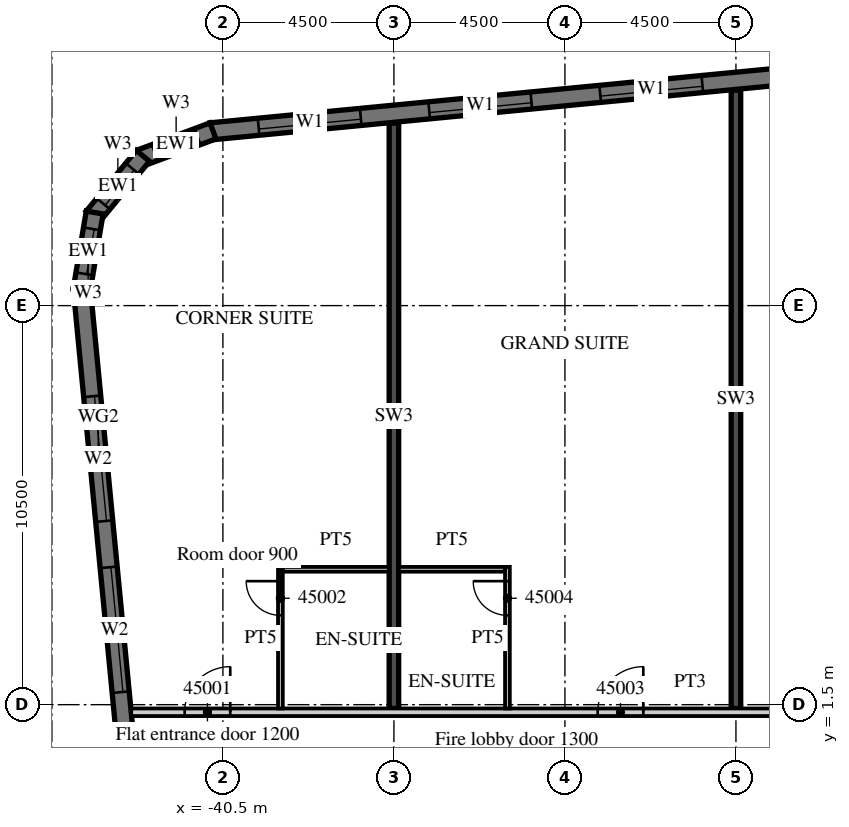
"""IFC4 building model, lengths in metres.
Left out: names, types, materials, properties, quantities, classifications, styles, units other than length and angle.
Written with IfcOpenShell. Run it as: python <this file> out.ifc"""

import sys

from ifc_helpers import new_model, si_unit, direction, frame, frame_2d, origin, place, context, subcontext, project, spatial, polyline, rectangle, outline, extrude, element, fill, save


model = new_model("IFC4")
c1 = context("Model", 3, precision=1e-05, world=origin(), true_north=direction((0.0, 1.0)))
c2 = subcontext(c1, "Body", "Model", "MODEL_VIEW")
j1 = project(units=[si_unit("LENGTHUNIT", "METRE"), si_unit("PLANEANGLEUNIT", "RADIAN")], contexts=[c1])
p1 = place(None, origin())
s1 = spatial("IfcSite", under=j1, at=p1, CompositionType="ELEMENT")
p2 = place(p1, origin())
s2 = spatial("IfcBuilding", under=s1, at=p2, CompositionType="ELEMENT")
p3 = place(p2, frame((0.0, 0.0, 190.0)))
s3 = spatial("IfcBuildingStorey", under=s2, at=p3, CompositionType="ELEMENT", Elevation=190.0)
p4 = place(p3, frame((-36.0, 1.4, 0.0), z_axis=(0.0, 0.0, 1.0), x_axis=(0.0, 1.0, 0.0)))
e1 = element("IfcWall", 1, at=p4, inside=s3, PredefinedType="SHEAR", context=c2, shape_type="SweptSolid", body=[
    extrude(rectangle(XDim=15.401, YDim=0.25, at=frame_2d((7.701, 0.0))), origin(), (0.0, 0.0, 1.0), 3.3),
])
p5 = place(p3, frame((-27.0, 1.4, 0.0), z_axis=(0.0, 0.0, 1.0), x_axis=(0.0, 1.0, 0.0)))
e2 = element("IfcWall", 2, at=p5, inside=s3, PredefinedType="SHEAR", context=c2, shape_type="SweptSolid", body=[
    extrude(rectangle(XDim=16.268, YDim=0.25, at=frame_2d((8.134, 0.0))), origin(), (0.0, 0.0, 1.0), 3.3),
])
p6 = place(p3, frame((-44.214, 12.466, 0.0), z_axis=(0.0, 0.0, 1.0), x_axis=(0.095847314626, -0.995396047952, 0.0)))
e3 = element("IfcWall", 3, at=p6, inside=s3, PredefinedType="SOLIDWALL", context=c2, shape_type="SweptSolid", body=[
    extrude(rectangle(XDim=34.0, YDim=0.45, at=frame_2d((17.0, 0.0))), origin(), (0.0, 0.0, 1.0), 3.02),
])
p7 = place(p6, frame((2.865, 0.0, 0.45)))
e4 = element("IfcOpeningElement", 4, at=p7, cuts=e3, PredefinedType="OPENING", context=c2, shape_type="SweptSolid", body=[
    extrude(rectangle(XDim=3.3, YDim=2.25, at=frame_2d((1.65, 1.125))), frame((0.0, 0.235, 0.0), z_axis=(0.0, -1.0, 0.0), x_axis=(1.0, 0.0, 0.0)), (0.0, 0.0, 1.0), 0.47),
])
p8 = place(p6, frame((7.386, 0.0, 0.45)))
e5 = element("IfcOpeningElement", 5, at=p8, cuts=e3, PredefinedType="OPENING", context=c2, shape_type="SweptSolid", body=[
    extrude(rectangle(XDim=3.3, YDim=2.25, at=frame_2d((1.65, 1.125))), frame((0.0, 0.235, 0.0), z_axis=(0.0, -1.0, 0.0), x_axis=(1.0, 0.0, 0.0)), (0.0, 0.0, 1.0), 0.47),
])
p9 = place(p3, frame((13.521, 21.817, 0.0), z_axis=(0.0, 0.0, 1.0), x_axis=(-0.995396508751, -0.095842529008, 0.0)))
e6 = element("IfcWall", 6, at=p9, inside=s3, PredefinedType="SOLIDWALL", context=c2, shape_type="SweptSolid", body=[
    extrude(rectangle(XDim=54.591, YDim=0.45, at=frame_2d((27.296, 0.0))), origin(), (0.0, 0.0, 1.0), 3.02),
])
p10 = place(p9, frame((0.91, 0.0, 0.45)))
e7 = element("IfcOpeningElement", 7, at=p10, cuts=e6, PredefinedType="OPENING", context=c2, shape_type="SweptSolid", body=[
    extrude(rectangle(XDim=2.7, YDim=2.25, at=frame_2d((1.35, 1.125))), frame((0.0, 0.235, 0.0), z_axis=(0.0, -1.0, 0.0), x_axis=(1.0, 0.0, 0.0)), (0.0, 0.0, 1.0), 0.47),
])
p11 = place(p9, frame((5.431, 0.0, 0.45)))
e8 = element("IfcOpeningElement", 8, at=p11, cuts=e6, PredefinedType="OPENING", context=c2, shape_type="SweptSolid", body=[
    extrude(rectangle(XDim=2.7, YDim=2.25, at=frame_2d((1.35, 1.125))), frame((0.0, 0.235, 0.0), z_axis=(0.0, -1.0, 0.0), x_axis=(1.0, 0.0, 0.0)), (0.0, 0.0, 1.0), 0.47),
])
p12 = place(p9, frame((9.952, 0.0, 0.45)))
e9 = element("IfcOpeningElement", 9, at=p12, cuts=e6, PredefinedType="OPENING", context=c2, shape_type="SweptSolid", body=[
    extrude(rectangle(XDim=2.7, YDim=2.25, at=frame_2d((1.35, 1.125))), frame((0.0, 0.235, 0.0), z_axis=(0.0, -1.0, 0.0), x_axis=(1.0, 0.0, 0.0)), (0.0, 0.0, 1.0), 0.47),
])
p13 = place(p9, frame((14.473, 0.0, 0.45)))
e10 = element("IfcOpeningElement", 10, at=p13, cuts=e6, PredefinedType="OPENING", context=c2, shape_type="SweptSolid", body=[
    extrude(rectangle(XDim=2.7, YDim=2.25, at=frame_2d((1.35, 1.125))), frame((0.0, 0.235, 0.0), z_axis=(0.0, -1.0, 0.0), x_axis=(1.0, 0.0, 0.0)), (0.0, 0.0, 1.0), 0.47),
])
p14 = place(p9, frame((18.994, 0.0, 0.45)))
e11 = element("IfcOpeningElement", 11, at=p14, cuts=e6, PredefinedType="OPENING", context=c2, shape_type="SweptSolid", body=[
    extrude(rectangle(XDim=2.7, YDim=2.25, at=frame_2d((1.35, 1.125))), frame((0.0, 0.235, 0.0), z_axis=(0.0, -1.0, 0.0), x_axis=(1.0, 0.0, 0.0)), (0.0, 0.0, 1.0), 0.47),
])
p15 = place(p9, frame((23.514, 0.0, 0.45)))
e12 = element("IfcOpeningElement", 12, at=p15, cuts=e6, PredefinedType="OPENING", context=c2, shape_type="SweptSolid", body=[
    extrude(rectangle(XDim=2.7, YDim=2.25, at=frame_2d((1.35, 1.125))), frame((0.0, 0.235, 0.0), z_axis=(0.0, -1.0, 0.0), x_axis=(1.0, 0.0, 0.0)), (0.0, 0.0, 1.0), 0.47),
])
p16 = place(p9, frame((28.035, 0.0, 0.45)))
e13 = element("IfcOpeningElement", 13, at=p16, cuts=e6, PredefinedType="OPENING", context=c2, shape_type="SweptSolid", body=[
    extrude(rectangle(XDim=2.7, YDim=2.25, at=frame_2d((1.35, 1.125))), frame((0.0, 0.235, 0.0), z_axis=(0.0, -1.0, 0.0), x_axis=(1.0, 0.0, 0.0)), (0.0, 0.0, 1.0), 0.47),
])
p17 = place(p9, frame((32.556, 0.0, 0.45)))
e14 = element("IfcOpeningElement", 14, at=p17, cuts=e6, PredefinedType="OPENING", context=c2, shape_type="SweptSolid", body=[
    extrude(rectangle(XDim=2.7, YDim=2.25, at=frame_2d((1.35, 1.125))), frame((0.0, 0.235, 0.0), z_axis=(0.0, -1.0, 0.0), x_axis=(1.0, 0.0, 0.0)), (0.0, 0.0, 1.0), 0.47),
])
p18 = place(p9, frame((37.077, 0.0, 0.45)))
e15 = element("IfcOpeningElement", 15, at=p18, cuts=e6, PredefinedType="OPENING", context=c2, shape_type="SweptSolid", body=[
    extrude(rectangle(XDim=2.7, YDim=2.25, at=frame_2d((1.35, 1.125))), frame((0.0, 0.235, 0.0), z_axis=(0.0, -1.0, 0.0), x_axis=(1.0, 0.0, 0.0)), (0.0, 0.0, 1.0), 0.47),
])
p19 = place(p9, frame((41.598, 0.0, 0.45)))
e16 = element("IfcOpeningElement", 16, at=p19, cuts=e6, PredefinedType="OPENING", context=c2, shape_type="SweptSolid", body=[
    extrude(rectangle(XDim=2.7, YDim=2.25, at=frame_2d((1.35, 1.125))), frame((0.0, 0.235, 0.0), z_axis=(0.0, -1.0, 0.0), x_axis=(1.0, 0.0, 0.0)), (0.0, 0.0, 1.0), 0.47),
])
p20 = place(p9, frame((46.118, 0.0, 0.45)))
e17 = element("IfcOpeningElement", 17, at=p20, cuts=e6, PredefinedType="OPENING", context=c2, shape_type="SweptSolid", body=[
    extrude(rectangle(XDim=2.7, YDim=2.25, at=frame_2d((1.35, 1.125))), frame((0.0, 0.235, 0.0), z_axis=(0.0, -1.0, 0.0), x_axis=(1.0, 0.0, 0.0)), (0.0, 0.0, 1.0), 0.47),
])
p21 = place(p9, frame((50.629, 0.0, 0.45)))
e18 = element("IfcOpeningElement", 18, at=p21, cuts=e6, PredefinedType="OPENING", context=c2, shape_type="SweptSolid", body=[
    extrude(rectangle(XDim=2.7, YDim=2.25, at=frame_2d((1.35, 1.125))), frame((0.0, 0.235, 0.0), z_axis=(0.0, -1.0, 0.0), x_axis=(1.0, 0.0, 0.0)), (0.0, 0.0, 1.0), 0.47),
])
p22 = place(p3, frame((-40.761, 16.598, 0.0), z_axis=(0.0, 0.0, 1.0), x_axis=(-0.936677599948, -0.350192909346, 0.0)))
e19 = element("IfcWall", 19, at=p22, inside=s3, PredefinedType="SOLIDWALL", context=c2, shape_type="SweptSolid", body=[
    extrude(outline(polyline([(0.0, -0.225), (2.071, -0.225), (1.95, 0.225), (0.121, 0.225), (0.0, -0.225)])), origin(), (0.0, 0.0, 1.0), 3.02),
])
p23 = place(p22, frame((0.435, 0.0, 0.45)))
e20 = element("IfcOpeningElement", 20, at=p23, cuts=e19, PredefinedType="OPENING", context=c2, shape_type="SweptSolid", body=[
    extrude(rectangle(XDim=1.2, YDim=2.25, at=frame_2d((0.6, 1.125))), frame((0.0, 0.235, 0.0), z_axis=(0.0, -1.0, 0.0), x_axis=(1.0, 0.0, 0.0)), (0.0, 0.0, 1.0), 0.47),
])
p24 = place(p3, frame((-42.606, 15.941, 0.0), z_axis=(0.0, 0.0, 1.0), x_axis=(-0.636116318187, -0.771593176315, 0.0)))
e21 = element("IfcWall", 21, at=p24, inside=s3, PredefinedType="SOLIDWALL", context=c2, shape_type="SweptSolid", body=[
    extrude(outline(polyline([(0.0, -0.225), (2.071, -0.225), (1.95, 0.225), (0.121, 0.225), (0.0, -0.225)])), origin(), (0.0, 0.0, 1.0), 3.02),
])
p25 = place(p24, frame((0.435, 0.0, 0.45)))
e22 = element("IfcOpeningElement", 22, at=p25, cuts=e21, PredefinedType="OPENING", context=c2, shape_type="SweptSolid", body=[
    extrude(rectangle(XDim=1.2, YDim=2.25, at=frame_2d((0.6, 1.125))), frame((0.0, 0.235, 0.0), z_axis=(0.0, -1.0, 0.0), x_axis=(1.0, 0.0, 0.0)), (0.0, 0.0, 1.0), 0.47),
])
p26 = place(p3, frame((-43.875, 14.449, 0.0), z_axis=(0.0, 0.0, 1.0), x_axis=(-0.164953448126, -0.986301353518, 0.0)))
e23 = element("IfcWall", 23, at=p26, inside=s3, PredefinedType="SOLIDWALL", context=c2, shape_type="SweptSolid", body=[
    extrude(outline(polyline([(0.0, -0.225), (2.071, -0.225), (1.95, 0.225), (0.121, 0.225), (0.0, -0.225)])), origin(), (0.0, 0.0, 1.0), 3.02),
])
p27 = place(p26, frame((0.435, 0.0, 0.45)))
e24 = element("IfcOpeningElement", 24, at=p27, cuts=e23, PredefinedType="OPENING", context=c2, shape_type="SweptSolid", body=[
    extrude(rectangle(XDim=1.2, YDim=2.25, at=frame_2d((0.6, 1.125))), frame((0.0, 0.235, 0.0), z_axis=(0.0, -1.0, 0.0), x_axis=(1.0, 0.0, 0.0)), (0.0, 0.0, 1.0), 0.47),
])
p28 = place(p3, frame((-42.913, 1.3, 0.0), z_axis=(0.0, 0.0, 1.0), x_axis=(1.0, 0.0, 0.0)))
e25 = element("IfcWall", 25, at=p28, inside=s3, PredefinedType="PARTITIONING", context=c2, shape_type="SweptSolid", body=[
    extrude(rectangle(XDim=29.413, YDim=0.2, at=frame_2d((14.707, 0.0))), origin(), (0.0, 0.0, 1.0), 3.02),
])
p29 = place(p28, frame((1.406, 0.0, 0.0)))
e26 = element("IfcOpeningElement", 26, at=p29, cuts=e25, PredefinedType="OPENING", context=c2, shape_type="SweptSolid", body=[
    extrude(rectangle(XDim=1.2, YDim=2.1, at=frame_2d((0.6, 1.05))), frame((0.0, 0.11, 0.0), z_axis=(0.0, -1.0, 0.0), x_axis=(1.0, 0.0, 0.0)), (0.0, 0.0, 1.0), 0.22),
])
p30 = place(p28, frame((12.275, 0.0, 0.0)))
e27 = element("IfcOpeningElement", 27, at=p30, cuts=e25, PredefinedType="OPENING", context=c2, shape_type="SweptSolid", body=[
    extrude(rectangle(XDim=1.2, YDim=2.1, at=frame_2d((0.6, 1.05))), frame((0.0, 0.11, 0.0), z_axis=(0.0, -1.0, 0.0), x_axis=(1.0, 0.0, 0.0)), (0.0, 0.0, 1.0), 0.22),
])
p31 = place(p28, frame((18.35, 0.0, 0.0)))
e28 = element("IfcOpeningElement", 28, at=p31, cuts=e25, PredefinedType="OPENING", context=c2, shape_type="SweptSolid", body=[
    extrude(rectangle(XDim=1.2, YDim=2.1, at=frame_2d((0.6, 1.05))), frame((0.0, 0.11, 0.0), z_axis=(0.0, -1.0, 0.0), x_axis=(1.0, 0.0, 0.0)), (0.0, 0.0, 1.0), 0.22),
])
p32 = place(p28, frame((25.488, 0.0, 0.0)))
e29 = element("IfcOpeningElement", 29, at=p32, cuts=e25, PredefinedType="OPENING", context=c2, shape_type="SweptSolid", body=[
    extrude(rectangle(XDim=1.0, YDim=2.1, at=frame_2d((0.5, 1.05))), frame((0.0, 0.11, 0.0), z_axis=(0.0, -1.0, 0.0), x_axis=(1.0, 0.0, 0.0)), (0.0, 0.0, 1.0), 0.22),
])
p33 = place(p3, frame((-38.987, 1.4, 0.0), z_axis=(0.0, 0.0, 1.0), x_axis=(0.0, 1.0, 0.0)))
e30 = element("IfcWall", 30, at=p33, inside=s3, PredefinedType="PARTITIONING", context=c2, shape_type="SweptSolid", body=[
    extrude(rectangle(XDim=3.725, YDim=0.125, at=frame_2d((1.863, 0.0))), origin(), (0.0, 0.0, 1.0), 3.02),
])
p34 = place(p33, frame((2.45, 0.0, 0.0)))
e31 = element("IfcOpeningElement", 31, at=p34, cuts=e30, PredefinedType="OPENING", context=c2, shape_type="SweptSolid", body=[
    extrude(rectangle(XDim=0.9, YDim=2.1, at=frame_2d((0.45, 1.05))), frame((0.0, 0.073, 0.0), z_axis=(0.0, -1.0, 0.0), x_axis=(1.0, 0.0, 0.0)), (0.0, 0.0, 1.0), 0.145),
])
p35 = place(p3, frame((-38.925, 5.062, 0.0), z_axis=(0.0, 0.0, 1.0), x_axis=(1.0, 0.0, 0.0)))
e32 = element("IfcWall", 32, at=p35, inside=s3, PredefinedType="PARTITIONING", context=c2, shape_type="SweptSolid", body=[
    extrude(rectangle(XDim=2.8, YDim=0.125, at=frame_2d((1.4, 0.0))), origin(), (0.0, 0.0, 1.0), 3.02),
])
p36 = place(p3, frame((-33.013, 1.4, 0.0), z_axis=(0.0, 0.0, 1.0), x_axis=(0.0, 1.0, 0.0)))
e33 = element("IfcWall", 33, at=p36, inside=s3, PredefinedType="PARTITIONING", context=c2, shape_type="SweptSolid", body=[
    extrude(rectangle(XDim=3.725, YDim=0.125, at=frame_2d((1.863, 0.0))), origin(), (0.0, 0.0, 1.0), 3.02),
])
p37 = place(p36, frame((2.45, 0.0, 0.0)))
e34 = element("IfcOpeningElement", 34, at=p37, cuts=e33, PredefinedType="OPENING", context=c2, shape_type="SweptSolid", body=[
    extrude(rectangle(XDim=0.9, YDim=2.1, at=frame_2d((0.45, 1.05))), frame((0.0, 0.073, 0.0), z_axis=(0.0, -1.0, 0.0), x_axis=(1.0, 0.0, 0.0)), (0.0, 0.0, 1.0), 0.145),
])
p38 = place(p3, frame((-35.875, 5.062, 0.0), z_axis=(0.0, 0.0, 1.0), x_axis=(1.0, 0.0, 0.0)))
e35 = element("IfcWall", 35, at=p38, inside=s3, PredefinedType="PARTITIONING", context=c2, shape_type="SweptSolid", body=[
    extrude(rectangle(XDim=2.8, YDim=0.125, at=frame_2d((1.4, 0.0))), origin(), (0.0, 0.0, 1.0), 3.02),
])
p39 = place(p7, origin())
e36 = element("IfcWindow", 36, at=p39, inside=s3, PartitioningType="SINGLE_PANEL", PredefinedType="WINDOW", context=c2, shape_type="SweptSolid", body=[
    extrude(rectangle(XDim=3.3, YDim=2.25, at=frame_2d((1.65, 1.125))), frame((0.0, 0.09, 0.0), z_axis=(0.0, -1.0, 0.0), x_axis=(1.0, 0.0, 0.0)), (0.0, 0.0, 1.0), 0.06),
])
fill(e4, e36)
p40 = place(p8, origin())
e37 = element("IfcWindow", 37, at=p40, inside=s3, PartitioningType="SINGLE_PANEL", PredefinedType="WINDOW", context=c2, shape_type="SweptSolid", body=[
    extrude(rectangle(XDim=3.3, YDim=2.25, at=frame_2d((1.65, 1.125))), frame((0.0, 0.09, 0.0), z_axis=(0.0, -1.0, 0.0), x_axis=(1.0, 0.0, 0.0)), (0.0, 0.0, 1.0), 0.06),
])
fill(e5, e37)
p41 = place(p19, origin())
e38 = element("IfcWindow", 38, at=p41, inside=s3, PartitioningType="SINGLE_PANEL", PredefinedType="WINDOW", context=c2, shape_type="SweptSolid", body=[
    extrude(rectangle(XDim=2.7, YDim=2.25, at=frame_2d((1.35, 1.125))), frame((0.0, 0.09, 0.0), z_axis=(0.0, -1.0, 0.0), x_axis=(1.0, 0.0, 0.0)), (0.0, 0.0, 1.0), 0.06),
])
fill(e16, e38)
p42 = place(p20, origin())
e39 = element("IfcWindow", 39, at=p42, inside=s3, PartitioningType="SINGLE_PANEL", PredefinedType="WINDOW", context=c2, shape_type="SweptSolid", body=[
    extrude(rectangle(XDim=2.7, YDim=2.25, at=frame_2d((1.35, 1.125))), frame((0.0, 0.09, 0.0), z_axis=(0.0, -1.0, 0.0), x_axis=(1.0, 0.0, 0.0)), (0.0, 0.0, 1.0), 0.06),
])
fill(e17, e39)
p43 = place(p21, origin())
e40 = element("IfcWindow", 40, at=p43, inside=s3, PartitioningType="SINGLE_PANEL", PredefinedType="WINDOW", context=c2, shape_type="SweptSolid", body=[
    extrude(rectangle(XDim=2.7, YDim=2.25, at=frame_2d((1.35, 1.125))), frame((0.0, 0.09, 0.0), z_axis=(0.0, -1.0, 0.0), x_axis=(1.0, 0.0, 0.0)), (0.0, 0.0, 1.0), 0.06),
])
fill(e18, e40)
p44 = place(p23, origin())
e41 = element("IfcWindow", 41, at=p44, inside=s3, PartitioningType="SINGLE_PANEL", PredefinedType="WINDOW", context=c2, shape_type="SweptSolid", body=[
    extrude(rectangle(XDim=1.2, YDim=2.25, at=frame_2d((0.6, 1.125))), frame((0.0, 0.09, 0.0), z_axis=(0.0, -1.0, 0.0), x_axis=(1.0, 0.0, 0.0)), (0.0, 0.0, 1.0), 0.06),
])
fill(e20, e41)
p45 = place(p25, origin())
e42 = element("IfcWindow", 42, at=p45, inside=s3, PartitioningType="SINGLE_PANEL", PredefinedType="WINDOW", context=c2, shape_type="SweptSolid", body=[
    extrude(rectangle(XDim=1.2, YDim=2.25, at=frame_2d((0.6, 1.125))), frame((0.0, 0.09, 0.0), z_axis=(0.0, -1.0, 0.0), x_axis=(1.0, 0.0, 0.0)), (0.0, 0.0, 1.0), 0.06),
])
fill(e22, e42)
p46 = place(p27, origin())
e43 = element("IfcWindow", 43, at=p46, inside=s3, PartitioningType="SINGLE_PANEL", PredefinedType="WINDOW", context=c2, shape_type="SweptSolid", body=[
    extrude(rectangle(XDim=1.2, YDim=2.25, at=frame_2d((0.6, 1.125))), frame((0.0, 0.09, 0.0), z_axis=(0.0, -1.0, 0.0), x_axis=(1.0, 0.0, 0.0)), (0.0, 0.0, 1.0), 0.06),
])
fill(e24, e43)
p47 = place(p29, origin())
e44 = element("IfcDoor", 44, at=p47, inside=s3, OperationType="SINGLE_SWING_RIGHT", PredefinedType="DOOR", context=c2, shape_type="SweptSolid", body=[
    extrude(rectangle(XDim=1.2, YDim=2.1, at=frame_2d((0.6, 1.05))), frame((0.0, 0.025, 0.0), z_axis=(0.0, -1.0, 0.0), x_axis=(1.0, 0.0, 0.0)), (0.0, 0.0, 1.0), 0.05),
])
fill(e26, e44)
p48 = place(p34, origin())
e45 = element("IfcDoor", 45, at=p48, inside=s3, OperationType="SINGLE_SWING_RIGHT", PredefinedType="DOOR", context=c2, shape_type="SweptSolid", body=[
    extrude(rectangle(XDim=0.9, YDim=2.1, at=frame_2d((0.45, 1.05))), frame((0.0, 0.025, 0.0), z_axis=(0.0, -1.0, 0.0), x_axis=(1.0, 0.0, 0.0)), (0.0, 0.0, 1.0), 0.05),
])
fill(e31, e45)
p49 = place(p30, origin())
e46 = element("IfcDoor", 46, at=p49, inside=s3, OperationType="SINGLE_SWING_RIGHT", PredefinedType="DOOR", context=c2, shape_type="SweptSolid", body=[
    extrude(rectangle(XDim=1.2, YDim=2.1, at=frame_2d((0.6, 1.05))), frame((0.0, 0.025, 0.0), z_axis=(0.0, -1.0, 0.0), x_axis=(1.0, 0.0, 0.0)), (0.0, 0.0, 1.0), 0.05),
])
fill(e27, e46)
p50 = place(p37, origin())
e47 = element("IfcDoor", 47, at=p50, inside=s3, OperationType="SINGLE_SWING_RIGHT", PredefinedType="DOOR", context=c2, shape_type="SweptSolid", body=[
    extrude(rectangle(XDim=0.9, YDim=2.1, at=frame_2d((0.45, 1.05))), frame((0.0, 0.025, 0.0), z_axis=(0.0, -1.0, 0.0), x_axis=(1.0, 0.0, 0.0)), (0.0, 0.0, 1.0), 0.05),
])
fill(e34, e47)
save(model, sys.argv[1])
